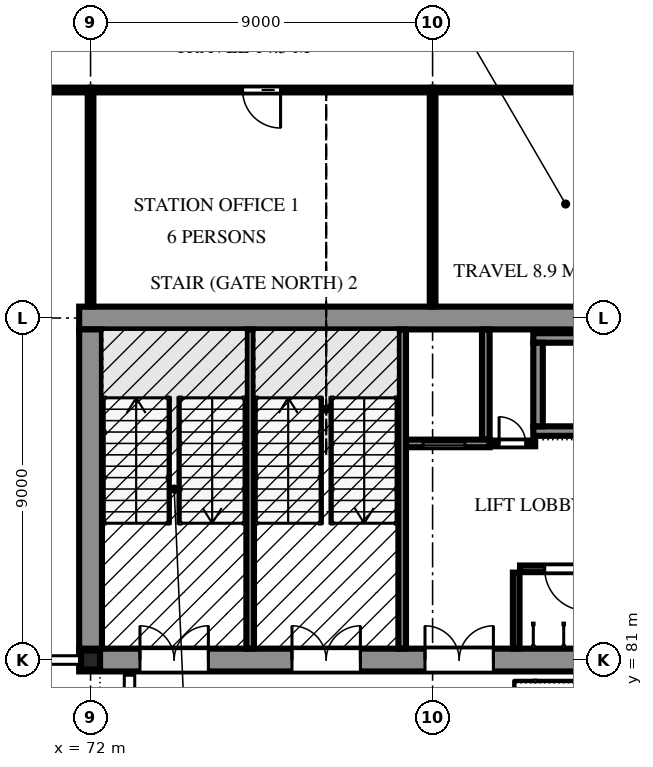
"""IFC4 building model, lengths in metres.
Left out: names, types, materials, properties, quantities, classifications, styles, units other than length and angle.
Written with IfcOpenShell. Run it as: python <this file> out.ifc"""

import sys

from ifc_helpers import new_model, si_unit, direction, frame, frame_2d, origin, origin_2d, place, context, subcontext, project, spatial, polyline, rectangle, hollow_rectangle, outline, extrude, element, fill, save


model = new_model("IFC4")
c1 = context("Model", 3, precision=1e-05, world=origin(), true_north=direction((0.0, 1.0)))
c2 = subcontext(c1, "Body", "Model", "MODEL_VIEW")
j1 = project(units=[si_unit("LENGTHUNIT", "METRE"), si_unit("PLANEANGLEUNIT", "RADIAN")], contexts=[c1])
p1 = place(None, origin())
s1 = spatial("IfcSite", under=j1, at=p1, CompositionType="ELEMENT")
p2 = place(p1, origin())
s2 = spatial("IfcBuilding", under=s1, at=p2, CompositionType="ELEMENT")
p3 = place(p2, frame((0.0, 0.0, 7.5)))
s3 = spatial("IfcBuildingStorey", under=s2, at=p3, CompositionType="ELEMENT", Elevation=7.5)
p4 = place(p3, frame((72.0, 81.0, 0.0), z_axis=(0.0, 0.0, 1.0), x_axis=(1.0, 0.0, 0.0)))
e1 = element("IfcColumn", 1, at=p4, inside=s3, PredefinedType="COLUMN", context=c2, shape_type="SweptSolid", body=[
    extrude(hollow_rectangle(XDim=0.5, YDim=0.5, WallThickness=0.032, at=origin_2d()), origin(), (0.0, 0.0, 1.0), 4.2),
])
p5 = place(p3, frame((71.7, 81.0, 0.0), z_axis=(0.0, 0.0, 1.0), x_axis=(1.0, 0.0, 0.0)))
e2 = element("IfcWall", 2, at=p5, inside=s3, PredefinedType="SOLIDWALL", context=c2, shape_type="SweptSolid", body=[
    extrude(rectangle(XDim=18.6, YDim=0.6, at=frame_2d((9.3, 0.0))), origin(), (0.0, 0.0, 1.0), 4.2),
])
p6 = place(p5, frame((1.6, 0.0, 0.0)))
e3 = element("IfcOpeningElement", 3, at=p6, cuts=e2, PredefinedType="OPENING", context=c2, shape_type="SweptSolid", body=[
    extrude(rectangle(XDim=1.8, YDim=2.1, at=frame_2d((0.9, 1.05))), frame((0.0, 0.31, 0.0), z_axis=(0.0, -1.0, 0.0), x_axis=(1.0, 0.0, 0.0)), (0.0, 0.0, 1.0), 0.62),
])
p7 = place(p5, frame((5.6, 0.0, 0.0)))
e4 = element("IfcOpeningElement", 4, at=p7, cuts=e2, PredefinedType="OPENING", context=c2, shape_type="SweptSolid", body=[
    extrude(rectangle(XDim=1.8, YDim=2.1, at=frame_2d((0.9, 1.05))), frame((0.0, 0.31, 0.0), z_axis=(0.0, -1.0, 0.0), x_axis=(1.0, 0.0, 0.0)), (0.0, 0.0, 1.0), 0.62),
])
p8 = place(p5, frame((9.1, 0.0, 0.0)))
e5 = element("IfcOpeningElement", 5, at=p8, cuts=e2, PredefinedType="OPENING", context=c2, shape_type="SweptSolid", body=[
    extrude(rectangle(XDim=1.8, YDim=2.1, at=frame_2d((0.9, 1.05))), frame((0.0, 0.31, 0.0), z_axis=(0.0, -1.0, 0.0), x_axis=(1.0, 0.0, 0.0)), (0.0, 0.0, 1.0), 0.62),
])
p9 = place(p3, frame((71.7, 90.0, 0.0), z_axis=(0.0, 0.0, 1.0), x_axis=(1.0, 0.0, 0.0)))
e6 = element("IfcWall", 6, at=p9, inside=s3, PredefinedType="SOLIDWALL", context=c2, shape_type="SweptSolid", body=[
    extrude(rectangle(XDim=18.6, YDim=0.6, at=frame_2d((9.3, 0.0))), origin(), (0.0, 0.0, 1.0), 4.2),
])
p10 = place(p3, frame((72.0, 81.3, 0.0), z_axis=(0.0, 0.0, 1.0), x_axis=(0.0, 1.0, 0.0)))
e7 = element("IfcWall", 7, at=p10, inside=s3, PredefinedType="SOLIDWALL", context=c2, shape_type="SweptSolid", body=[
    extrude(rectangle(XDim=8.4, YDim=0.6, at=frame_2d((4.2, 0.0))), origin(), (0.0, 0.0, 1.0), 4.2),
])
for number, where, z_axis, x_axis in (
    (8, (76.2, 81.302, -0.13), (0.0, 0.0, 1.0), (0.0, 1.0, 0.0)),
    (9, (80.2, 81.302, -0.13), (0.0, 0.0, 1.0), (0.0, 1.0, 0.0)),
):
    element("IfcWall", number, at=place(p3, frame(where, z_axis=z_axis, x_axis=x_axis)), inside=s3, PredefinedType="SOLIDWALL", context=c2, shape_type="SweptSolid", body=[
        extrude(rectangle(XDim=8.396, YDim=0.2, at=frame_2d((4.198, 0.0))), origin(), (0.0, 0.0, 1.0), 3.646),
    ])
p11 = place(p3, frame((80.302, 86.7, 0.0), z_axis=(0.0, 0.0, 1.0), x_axis=(1.0, 0.0, 0.0)))
e10 = element("IfcWall", 10, at=p11, inside=s3, PredefinedType="SOLIDWALL", context=c2, shape_type="SweptSolid", body=[
    extrude(rectangle(XDim=2.198, YDim=0.2, at=frame_2d((1.099, 0.0))), origin(), (0.0, 0.0, 1.0), 3.516),
])
p12 = place(p11, frame((0.448, 0.0, 0.0)))
e11 = element("IfcOpeningElement", 11, at=p12, cuts=e10, PredefinedType="OPENING", context=c2, shape_type="SweptSolid", body=[
    extrude(rectangle(XDim=1.1, YDim=2.1, at=frame_2d((0.55, 1.05))), frame((0.0, 0.11, 0.0), z_axis=(0.0, -1.0, 0.0), x_axis=(1.0, 0.0, 0.0)), (0.0, 0.0, 1.0), 0.22),
])
p13 = place(p3, frame((82.4, 86.8, 0.0), z_axis=(0.0, 0.0, 1.0), x_axis=(0.0, 1.0, 0.0)))
e12 = element("IfcWall", 12, at=p13, inside=s3, PredefinedType="SOLIDWALL", context=c2, shape_type="SweptSolid", body=[
    extrude(rectangle(XDim=2.898, YDim=0.2, at=frame_2d((1.449, 0.0))), origin(), (0.0, 0.0, 1.0), 3.516),
])
for number, where, z_axis, x_axis in (
    (13, (83.65, 87.025, 0.0), (0.0, 0.0, 1.0), (1.0, 0.0, 0.0)),
    (14, (83.65, 89.475, 0.0), (0.0, 0.0, 1.0), (1.0, 0.0, 0.0)),
):
    element("IfcWall", number, at=place(p3, frame(where, z_axis=z_axis, x_axis=x_axis)), inside=s3, PredefinedType="SOLIDWALL", context=c2, shape_type="SweptSolid", body=[
        extrude(rectangle(XDim=3.4, YDim=0.25, at=frame_2d((1.7, 0.0))), origin(), (0.0, 0.0, 1.0), 3.516),
    ])
p14 = place(p3, frame((83.775, 87.15, 0.0), z_axis=(0.0, 0.0, 1.0), x_axis=(0.0, 1.0, 0.0)))
e15 = element("IfcWall", 15, at=p14, inside=s3, PredefinedType="SOLIDWALL", context=c2, shape_type="SweptSolid", body=[
    extrude(rectangle(XDim=2.2, YDim=0.25, at=frame_2d((1.1, 0.0))), origin(), (0.0, 0.0, 1.0), 3.516),
])
p15 = place(p3, frame((72.0, 96.0, 0.0), z_axis=(0.0, 0.0, 1.0), x_axis=(-1.0, 0.0, 0.0)))
e16 = element("IfcWall", 16, at=p15, inside=s3, PredefinedType="PARTITIONING", context=c2, shape_type="SweptSolid", body=[
    extrude(rectangle(XDim=8.858, YDim=0.125, at=frame_2d((4.429, 0.0))), origin(), (0.0, 0.0, 1.0), 3.307),
])
p16 = place(p15, frame((4.0, 0.0, 0.0)))
e17 = element("IfcOpeningElement", 17, at=p16, cuts=e16, PredefinedType="OPENING", context=c2, shape_type="SweptSolid", body=[
    extrude(rectangle(XDim=1.0, YDim=2.1, at=frame_2d((0.5, 1.05))), frame((0.0, 0.073, 0.0), z_axis=(0.0, -1.0, 0.0), x_axis=(1.0, 0.0, 0.0)), (0.0, 0.0, 1.0), 0.145),
])
p17 = place(p3, frame((90.0, 96.0, 0.0), z_axis=(0.0, 0.0, 1.0), x_axis=(-1.0, 0.0, 0.0)))
e18 = element("IfcWall", 18, at=p17, inside=s3, PredefinedType="PARTITIONING", context=c2, shape_type="SweptSolid", body=[
    extrude(rectangle(XDim=9.0, YDim=0.125, at=frame_2d((4.5, 0.0))), origin(), (0.0, 0.0, 1.0), 3.307),
])
p18 = place(p17, frame((4.0, 0.0, 0.0)))
e19 = element("IfcOpeningElement", 19, at=p18, cuts=e18, PredefinedType="OPENING", context=c2, shape_type="SweptSolid", body=[
    extrude(rectangle(XDim=1.0, YDim=2.1, at=frame_2d((0.5, 1.05))), frame((0.0, 0.073, 0.0), z_axis=(0.0, -1.0, 0.0), x_axis=(1.0, 0.0, 0.0)), (0.0, 0.0, 1.0), 0.145),
])
p19 = place(p3, frame((81.0, 96.0, 0.0), z_axis=(0.0, 0.0, 1.0), x_axis=(-1.0, 0.0, 0.0)))
e20 = element("IfcWall", 20, at=p19, inside=s3, PredefinedType="PARTITIONING", context=c2, shape_type="SweptSolid", body=[
    extrude(rectangle(XDim=9.0, YDim=0.125, at=frame_2d((4.5, 0.0))), origin(), (0.0, 0.0, 1.0), 3.307),
])
p20 = place(p19, frame((4.0, 0.0, 0.0)))
e21 = element("IfcOpeningElement", 21, at=p20, cuts=e20, PredefinedType="OPENING", context=c2, shape_type="SweptSolid", body=[
    extrude(rectangle(XDim=1.0, YDim=2.1, at=frame_2d((0.5, 1.05))), frame((0.0, 0.073, 0.0), z_axis=(0.0, -1.0, 0.0), x_axis=(1.0, 0.0, 0.0)), (0.0, 0.0, 1.0), 0.145),
])
for number, where, z_axis, x_axis in (
    (22, (72.0, 95.938, 0.0), (0.0, 0.0, 1.0), (0.0, -1.0, 0.0)),
    (23, (81.0, 95.938, 0.0), (0.0, 0.0, 1.0), (0.0, -1.0, 0.0)),
):
    element("IfcWall", number, at=place(p3, frame(where, z_axis=z_axis, x_axis=x_axis)), inside=s3, PredefinedType="PARTITIONING", context=c2, shape_type="SweptSolid", body=[
        extrude(rectangle(XDim=5.635, YDim=0.15, at=frame_2d((2.818, 0.0))), origin(), (0.0, 0.0, 1.0), 3.307),
    ])
p21 = place(p3, frame((85.7, 83.4, 0.0), z_axis=(0.0, 0.0, 1.0), x_axis=(-1.0, 0.0, 0.0)))
e24 = element("IfcWall", 24, at=p21, inside=s3, PredefinedType="PARTITIONING", context=c2, shape_type="SweptSolid", body=[
    extrude(rectangle(XDim=2.4, YDim=0.175, at=frame_2d((1.2, 0.0))), origin(), (0.0, 0.0, 1.0), 3.307),
])
p22 = place(p21, frame((0.65, 0.0, 0.0)))
e25 = element("IfcOpeningElement", 25, at=p22, cuts=e24, PredefinedType="OPENING", context=c2, shape_type="SweptSolid", body=[
    extrude(rectangle(XDim=1.1, YDim=2.1, at=frame_2d((0.55, 1.05))), frame((0.0, 0.097, 0.0), z_axis=(0.0, -1.0, 0.0), x_axis=(1.0, 0.0, 0.0)), (0.0, 0.0, 1.0), 0.195),
])
p23 = place(p3, frame((83.2, 83.3, 0.0), z_axis=(0.0, 0.0, 1.0), x_axis=(0.0, -1.0, 0.0)))
e26 = element("IfcWall", 26, at=p23, inside=s3, PredefinedType="PARTITIONING", context=c2, shape_type="SweptSolid", body=[
    extrude(rectangle(XDim=1.998, YDim=0.175, at=frame_2d((0.999, 0.0))), origin(), (0.0, 0.0, 1.0), 3.307),
])
p24 = place(p3, frame((82.502, 86.7, 0.0), z_axis=(0.0, 0.0, 1.0), x_axis=(1.0, 0.0, 0.0)))
e27 = element("IfcWall", 27, at=p24, inside=s3, PredefinedType="SOLIDWALL", context=c2, shape_type="SweptSolid", body=[
    extrude(rectangle(XDim=1.198, YDim=0.15, at=frame_2d((0.599, 0.0))), origin(), (0.0, 0.0, 1.0), 3.516),
])
p25 = place(p24, frame((0.248, 0.0, 0.0)))
e28 = element("IfcOpeningElement", 28, at=p25, cuts=e27, PredefinedType="OPENING", context=c2, shape_type="SweptSolid", body=[
    extrude(rectangle(XDim=0.7, YDim=2.0, at=frame_2d((0.35, 1.0))), frame((0.0, 0.085, 0.0), z_axis=(0.0, -1.0, 0.0), x_axis=(1.0, 0.0, 0.0)), (0.0, 0.0, 1.0), 0.17),
])
p26 = place(p12, origin())
e29 = element("IfcDoor", 29, at=p26, inside=s3, OperationType="SLIDING_TO_LEFT", PredefinedType="DOOR", context=c2, shape_type="SweptSolid", body=[
    extrude(outline(polyline([(0.0, 0.0), (0.07, 0.0), (0.07, 2.03), (1.03, 2.03), (1.03, 0.0), (1.1, 0.0), (1.1, 2.1), (0.0, 2.1), (0.0, 0.0)])), frame((0.0, 0.025, 0.0), z_axis=(0.0, -1.0, 0.0), x_axis=(1.0, 0.0, 0.0)), (0.0, 0.0, 1.0), 0.05),
    extrude(rectangle(XDim=0.524, YDim=2.016, at=frame_2d((0.336, 1.018))), frame((0.0, 0.018, 0.0), z_axis=(0.0, -1.0, 0.0), x_axis=(1.0, 0.0, 0.0)), (0.0, 0.0, 1.0), 0.016),
    extrude(rectangle(XDim=0.52, YDim=2.016, at=frame_2d((0.766, 1.018))), frame((0.0, -0.002, 0.0), z_axis=(0.0, -1.0, 0.0), x_axis=(1.0, 0.0, 0.0)), (0.0, 0.0, 1.0), 0.016),
])
fill(e11, e29)
p27 = place(p20, origin())
e30 = element("IfcDoor", 30, at=p27, inside=s3, OperationType="SINGLE_SWING_LEFT", PredefinedType="DOOR", context=c2, shape_type="SweptSolid", body=[
    extrude(outline(polyline([(0.0, 0.0), (0.07, 0.0), (0.07, 2.03), (0.93, 2.03), (0.93, 0.0), (1.0, 0.0), (1.0, 2.1), (0.0, 2.1), (0.0, 0.0)])), frame((0.0, 0.025, 0.0), z_axis=(0.0, -1.0, 0.0), x_axis=(1.0, 0.0, 0.0)), (0.0, 0.0, 1.0), 0.05),
    extrude(outline(polyline([(0.074, 0.01), (0.926, 0.01), (0.926, 2.026), (0.074, 2.026), (0.074, 0.01)]), holes=[polyline([(0.194, 0.16), (0.806, 0.16), (0.806, 1.01), (0.194, 1.01), (0.194, 0.16)]), polyline([(0.35, 1.16), (0.65, 1.16), (0.65, 1.76), (0.35, 1.76), (0.35, 1.16)])]), frame((0.0, 0.017, 0.0), z_axis=(0.0, -1.0, 0.0), x_axis=(1.0, 0.0, 0.0)), (0.0, 0.0, 1.0), 0.035),
    extrude(rectangle(XDim=0.612, YDim=0.85, at=frame_2d((0.5, 0.585))), frame((0.0, 0.009, 0.0), z_axis=(0.0, -1.0, 0.0), x_axis=(1.0, 0.0, 0.0)), (0.0, 0.0, 1.0), 0.017),
    extrude(rectangle(XDim=0.3, YDim=0.6, at=frame_2d((0.5, 1.46))), frame((0.0, 0.006, 0.0), z_axis=(0.0, -1.0, 0.0), x_axis=(1.0, 0.0, 0.0)), (0.0, 0.0, 1.0), 0.012),
])
fill(e21, e30)
p28 = place(p6, origin())
e31 = element("IfcDoor", 31, at=p28, inside=s3, OperationType="DOUBLE_DOOR_SINGLE_SWING", PredefinedType="DOOR", context=c2, shape_type="SweptSolid", body=[
    extrude(outline(polyline([(0.0, 0.0), (0.07, 0.0), (0.07, 2.03), (1.73, 2.03), (1.73, 0.0), (1.8, 0.0), (1.8, 2.1), (0.0, 2.1), (0.0, 0.0)])), frame((0.0, 0.025, 0.0), z_axis=(0.0, -1.0, 0.0), x_axis=(1.0, 0.0, 0.0)), (0.0, 0.0, 1.0), 0.05),
    extrude(outline(polyline([(0.074, 0.01), (0.897, 0.01), (0.897, 2.026), (0.074, 2.026), (0.074, 0.01)]), holes=[polyline([(0.194, 0.16), (0.777, 0.16), (0.777, 1.01), (0.194, 1.01), (0.194, 0.16)]), polyline([(0.335, 1.16), (0.635, 1.16), (0.635, 1.76), (0.335, 1.76), (0.335, 1.16)])]), frame((0.0, 0.017, 0.0), z_axis=(0.0, -1.0, 0.0), x_axis=(1.0, 0.0, 0.0)), (0.0, 0.0, 1.0), 0.035),
    extrude(rectangle(XDim=0.583, YDim=0.85, at=frame_2d((0.485, 0.585))), frame((0.0, 0.009, 0.0), z_axis=(0.0, -1.0, 0.0), x_axis=(1.0, 0.0, 0.0)), (0.0, 0.0, 1.0), 0.017),
    extrude(rectangle(XDim=0.3, YDim=0.6, at=frame_2d((0.485, 1.46))), frame((0.0, 0.006, 0.0), z_axis=(0.0, -1.0, 0.0), x_axis=(1.0, 0.0, 0.0)), (0.0, 0.0, 1.0), 0.012),
    extrude(outline(polyline([(0.903, 0.01), (1.726, 0.01), (1.726, 2.026), (0.903, 2.026), (0.903, 0.01)]), holes=[polyline([(1.023, 0.16), (1.606, 0.16), (1.606, 1.01), (1.023, 1.01), (1.023, 0.16)]), polyline([(1.165, 1.16), (1.465, 1.16), (1.465, 1.76), (1.165, 1.76), (1.165, 1.16)])]), frame((0.0, 0.017, 0.0), z_axis=(0.0, -1.0, 0.0), x_axis=(1.0, 0.0, 0.0)), (0.0, 0.0, 1.0), 0.035),
    extrude(rectangle(XDim=0.583, YDim=0.85, at=frame_2d((1.314, 0.585))), frame((0.0, 0.009, 0.0), z_axis=(0.0, -1.0, 0.0), x_axis=(1.0, 0.0, 0.0)), (0.0, 0.0, 1.0), 0.017),
    extrude(rectangle(XDim=0.3, YDim=0.6, at=frame_2d((1.314, 1.46))), frame((0.0, 0.006, 0.0), z_axis=(0.0, -1.0, 0.0), x_axis=(1.0, 0.0, 0.0)), (0.0, 0.0, 1.0), 0.012),
])
fill(e3, e31)
p29 = place(p7, origin())
e32 = element("IfcDoor", 32, at=p29, inside=s3, OperationType="DOUBLE_DOOR_SINGLE_SWING", PredefinedType="DOOR", context=c2, shape_type="SweptSolid", body=[
    extrude(outline(polyline([(0.0, 0.0), (0.07, 0.0), (0.07, 2.03), (1.73, 2.03), (1.73, 0.0), (1.8, 0.0), (1.8, 2.1), (0.0, 2.1), (0.0, 0.0)])), frame((0.0, 0.025, 0.0), z_axis=(0.0, -1.0, 0.0), x_axis=(1.0, 0.0, 0.0)), (0.0, 0.0, 1.0), 0.05),
    extrude(outline(polyline([(0.074, 0.01), (0.897, 0.01), (0.897, 2.026), (0.074, 2.026), (0.074, 0.01)]), holes=[polyline([(0.194, 0.16), (0.777, 0.16), (0.777, 1.01), (0.194, 1.01), (0.194, 0.16)]), polyline([(0.335, 1.16), (0.635, 1.16), (0.635, 1.76), (0.335, 1.76), (0.335, 1.16)])]), frame((0.0, 0.017, 0.0), z_axis=(0.0, -1.0, 0.0), x_axis=(1.0, 0.0, 0.0)), (0.0, 0.0, 1.0), 0.035),
    extrude(rectangle(XDim=0.583, YDim=0.85, at=frame_2d((0.485, 0.585))), frame((0.0, 0.009, 0.0), z_axis=(0.0, -1.0, 0.0), x_axis=(1.0, 0.0, 0.0)), (0.0, 0.0, 1.0), 0.017),
    extrude(rectangle(XDim=0.3, YDim=0.6, at=frame_2d((0.485, 1.46))), frame((0.0, 0.006, 0.0), z_axis=(0.0, -1.0, 0.0), x_axis=(1.0, 0.0, 0.0)), (0.0, 0.0, 1.0), 0.012),
    extrude(outline(polyline([(0.903, 0.01), (1.726, 0.01), (1.726, 2.026), (0.903, 2.026), (0.903, 0.01)]), holes=[polyline([(1.023, 0.16), (1.606, 0.16), (1.606, 1.01), (1.023, 1.01), (1.023, 0.16)]), polyline([(1.165, 1.16), (1.465, 1.16), (1.465, 1.76), (1.165, 1.76), (1.165, 1.16)])]), frame((0.0, 0.017, 0.0), z_axis=(0.0, -1.0, 0.0), x_axis=(1.0, 0.0, 0.0)), (0.0, 0.0, 1.0), 0.035),
    extrude(rectangle(XDim=0.583, YDim=0.85, at=frame_2d((1.314, 0.585))), frame((0.0, 0.009, 0.0), z_axis=(0.0, -1.0, 0.0), x_axis=(1.0, 0.0, 0.0)), (0.0, 0.0, 1.0), 0.017),
    extrude(rectangle(XDim=0.3, YDim=0.6, at=frame_2d((1.314, 1.46))), frame((0.0, 0.006, 0.0), z_axis=(0.0, -1.0, 0.0), x_axis=(1.0, 0.0, 0.0)), (0.0, 0.0, 1.0), 0.012),
])
fill(e4, e32)
p30 = place(p8, origin())
e33 = element("IfcDoor", 33, at=p30, inside=s3, OperationType="DOUBLE_DOOR_SINGLE_SWING", PredefinedType="DOOR", context=c2, shape_type="SweptSolid", body=[
    extrude(outline(polyline([(0.0, 0.0), (0.07, 0.0), (0.07, 2.03), (1.73, 2.03), (1.73, 0.0), (1.8, 0.0), (1.8, 2.1), (0.0, 2.1), (0.0, 0.0)])), frame((0.0, 0.025, 0.0), z_axis=(0.0, -1.0, 0.0), x_axis=(1.0, 0.0, 0.0)), (0.0, 0.0, 1.0), 0.05),
    extrude(outline(polyline([(0.074, 0.01), (0.897, 0.01), (0.897, 2.026), (0.074, 2.026), (0.074, 0.01)]), holes=[polyline([(0.194, 0.16), (0.777, 0.16), (0.777, 1.01), (0.194, 1.01), (0.194, 0.16)]), polyline([(0.335, 1.16), (0.635, 1.16), (0.635, 1.76), (0.335, 1.76), (0.335, 1.16)])]), frame((0.0, 0.017, 0.0), z_axis=(0.0, -1.0, 0.0), x_axis=(1.0, 0.0, 0.0)), (0.0, 0.0, 1.0), 0.035),
    extrude(rectangle(XDim=0.583, YDim=0.85, at=frame_2d((0.485, 0.585))), frame((0.0, 0.009, 0.0), z_axis=(0.0, -1.0, 0.0), x_axis=(1.0, 0.0, 0.0)), (0.0, 0.0, 1.0), 0.017),
    extrude(rectangle(XDim=0.3, YDim=0.6, at=frame_2d((0.485, 1.46))), frame((0.0, 0.006, 0.0), z_axis=(0.0, -1.0, 0.0), x_axis=(1.0, 0.0, 0.0)), (0.0, 0.0, 1.0), 0.012),
    extrude(outline(polyline([(0.903, 0.01), (1.726, 0.01), (1.726, 2.026), (0.903, 2.026), (0.903, 0.01)]), holes=[polyline([(1.023, 0.16), (1.606, 0.16), (1.606, 1.01), (1.023, 1.01), (1.023, 0.16)]), polyline([(1.165, 1.16), (1.465, 1.16), (1.465, 1.76), (1.165, 1.76), (1.165, 1.16)])]), frame((0.0, 0.017, 0.0), z_axis=(0.0, -1.0, 0.0), x_axis=(1.0, 0.0, 0.0)), (0.0, 0.0, 1.0), 0.035),
    extrude(rectangle(XDim=0.583, YDim=0.85, at=frame_2d((1.314, 0.585))), frame((0.0, 0.009, 0.0), z_axis=(0.0, -1.0, 0.0), x_axis=(1.0, 0.0, 0.0)), (0.0, 0.0, 1.0), 0.017),
    extrude(rectangle(XDim=0.3, YDim=0.6, at=frame_2d((1.314, 1.46))), frame((0.0, 0.006, 0.0), z_axis=(0.0, -1.0, 0.0), x_axis=(1.0, 0.0, 0.0)), (0.0, 0.0, 1.0), 0.012),
])
fill(e5, e33)
p31 = place(p25, origin())
e34 = element("IfcDoor", 34, at=p31, inside=s3, OperationType="SINGLE_SWING_LEFT", PredefinedType="DOOR", context=c2, shape_type="SweptSolid", body=[
    extrude(outline(polyline([(0.0, 0.0), (0.07, 0.0), (0.07, 1.93), (0.63, 1.93), (0.63, 0.0), (0.7, 0.0), (0.7, 2.0), (0.0, 2.0), (0.0, 0.0)])), frame((0.0, 0.025, 0.0), z_axis=(0.0, -1.0, 0.0), x_axis=(1.0, 0.0, 0.0)), (0.0, 0.0, 1.0), 0.05),
    extrude(outline(polyline([(0.074, 0.01), (0.626, 0.01), (0.626, 1.926), (0.074, 1.926), (0.074, 0.01)]), holes=[polyline([(0.184, 0.16), (0.516, 0.16), (0.516, 1.01), (0.184, 1.01), (0.184, 0.16)]), polyline([(0.2, 1.16), (0.5, 1.16), (0.5, 1.76), (0.2, 1.76), (0.2, 1.16)])]), frame((0.0, 0.017, 0.0), z_axis=(0.0, -1.0, 0.0), x_axis=(1.0, 0.0, 0.0)), (0.0, 0.0, 1.0), 0.035),
    extrude(rectangle(XDim=0.331, YDim=0.85, at=frame_2d((0.35, 0.585))), frame((0.0, 0.009, 0.0), z_axis=(0.0, -1.0, 0.0), x_axis=(1.0, 0.0, 0.0)), (0.0, 0.0, 1.0), 0.017),
    extrude(rectangle(XDim=0.3, YDim=0.6, at=frame_2d((0.35, 1.46))), frame((0.0, 0.006, 0.0), z_axis=(0.0, -1.0, 0.0), x_axis=(1.0, 0.0, 0.0)), (0.0, 0.0, 1.0), 0.012),
])
fill(e28, e34)
p32 = place(p22, origin())
e35 = element("IfcDoor", 35, at=p32, inside=s3, OperationType="SINGLE_SWING_LEFT", PredefinedType="DOOR", context=c2, shape_type="SweptSolid", body=[
    extrude(outline(polyline([(0.0, 0.0), (0.07, 0.0), (0.07, 2.03), (1.03, 2.03), (1.03, 0.0), (1.1, 0.0), (1.1, 2.1), (0.0, 2.1), (0.0, 0.0)])), frame((0.0, 0.025, 0.0), z_axis=(0.0, -1.0, 0.0), x_axis=(1.0, 0.0, 0.0)), (0.0, 0.0, 1.0), 0.05),
    extrude(outline(polyline([(0.074, 0.01), (1.026, 0.01), (1.026, 2.026), (0.074, 2.026), (0.074, 0.01)]), holes=[polyline([(0.194, 0.16), (0.906, 0.16), (0.906, 1.01), (0.194, 1.01), (0.194, 0.16)]), polyline([(0.4, 1.16), (0.7, 1.16), (0.7, 1.76), (0.4, 1.76), (0.4, 1.16)])]), frame((0.0, 0.017, 0.0), z_axis=(0.0, -1.0, 0.0), x_axis=(1.0, 0.0, 0.0)), (0.0, 0.0, 1.0), 0.035),
    extrude(rectangle(XDim=0.712, YDim=0.85, at=frame_2d((0.55, 0.585))), frame((0.0, 0.009, 0.0), z_axis=(0.0, -1.0, 0.0), x_axis=(1.0, 0.0, 0.0)), (0.0, 0.0, 1.0), 0.017),
    extrude(rectangle(XDim=0.3, YDim=0.6, at=frame_2d((0.55, 1.46))), frame((0.0, 0.006, 0.0), z_axis=(0.0, -1.0, 0.0), x_axis=(1.0, 0.0, 0.0)), (0.0, 0.0, 1.0), 0.012),
])
fill(e25, e35)
save(model, sys.argv[1])
